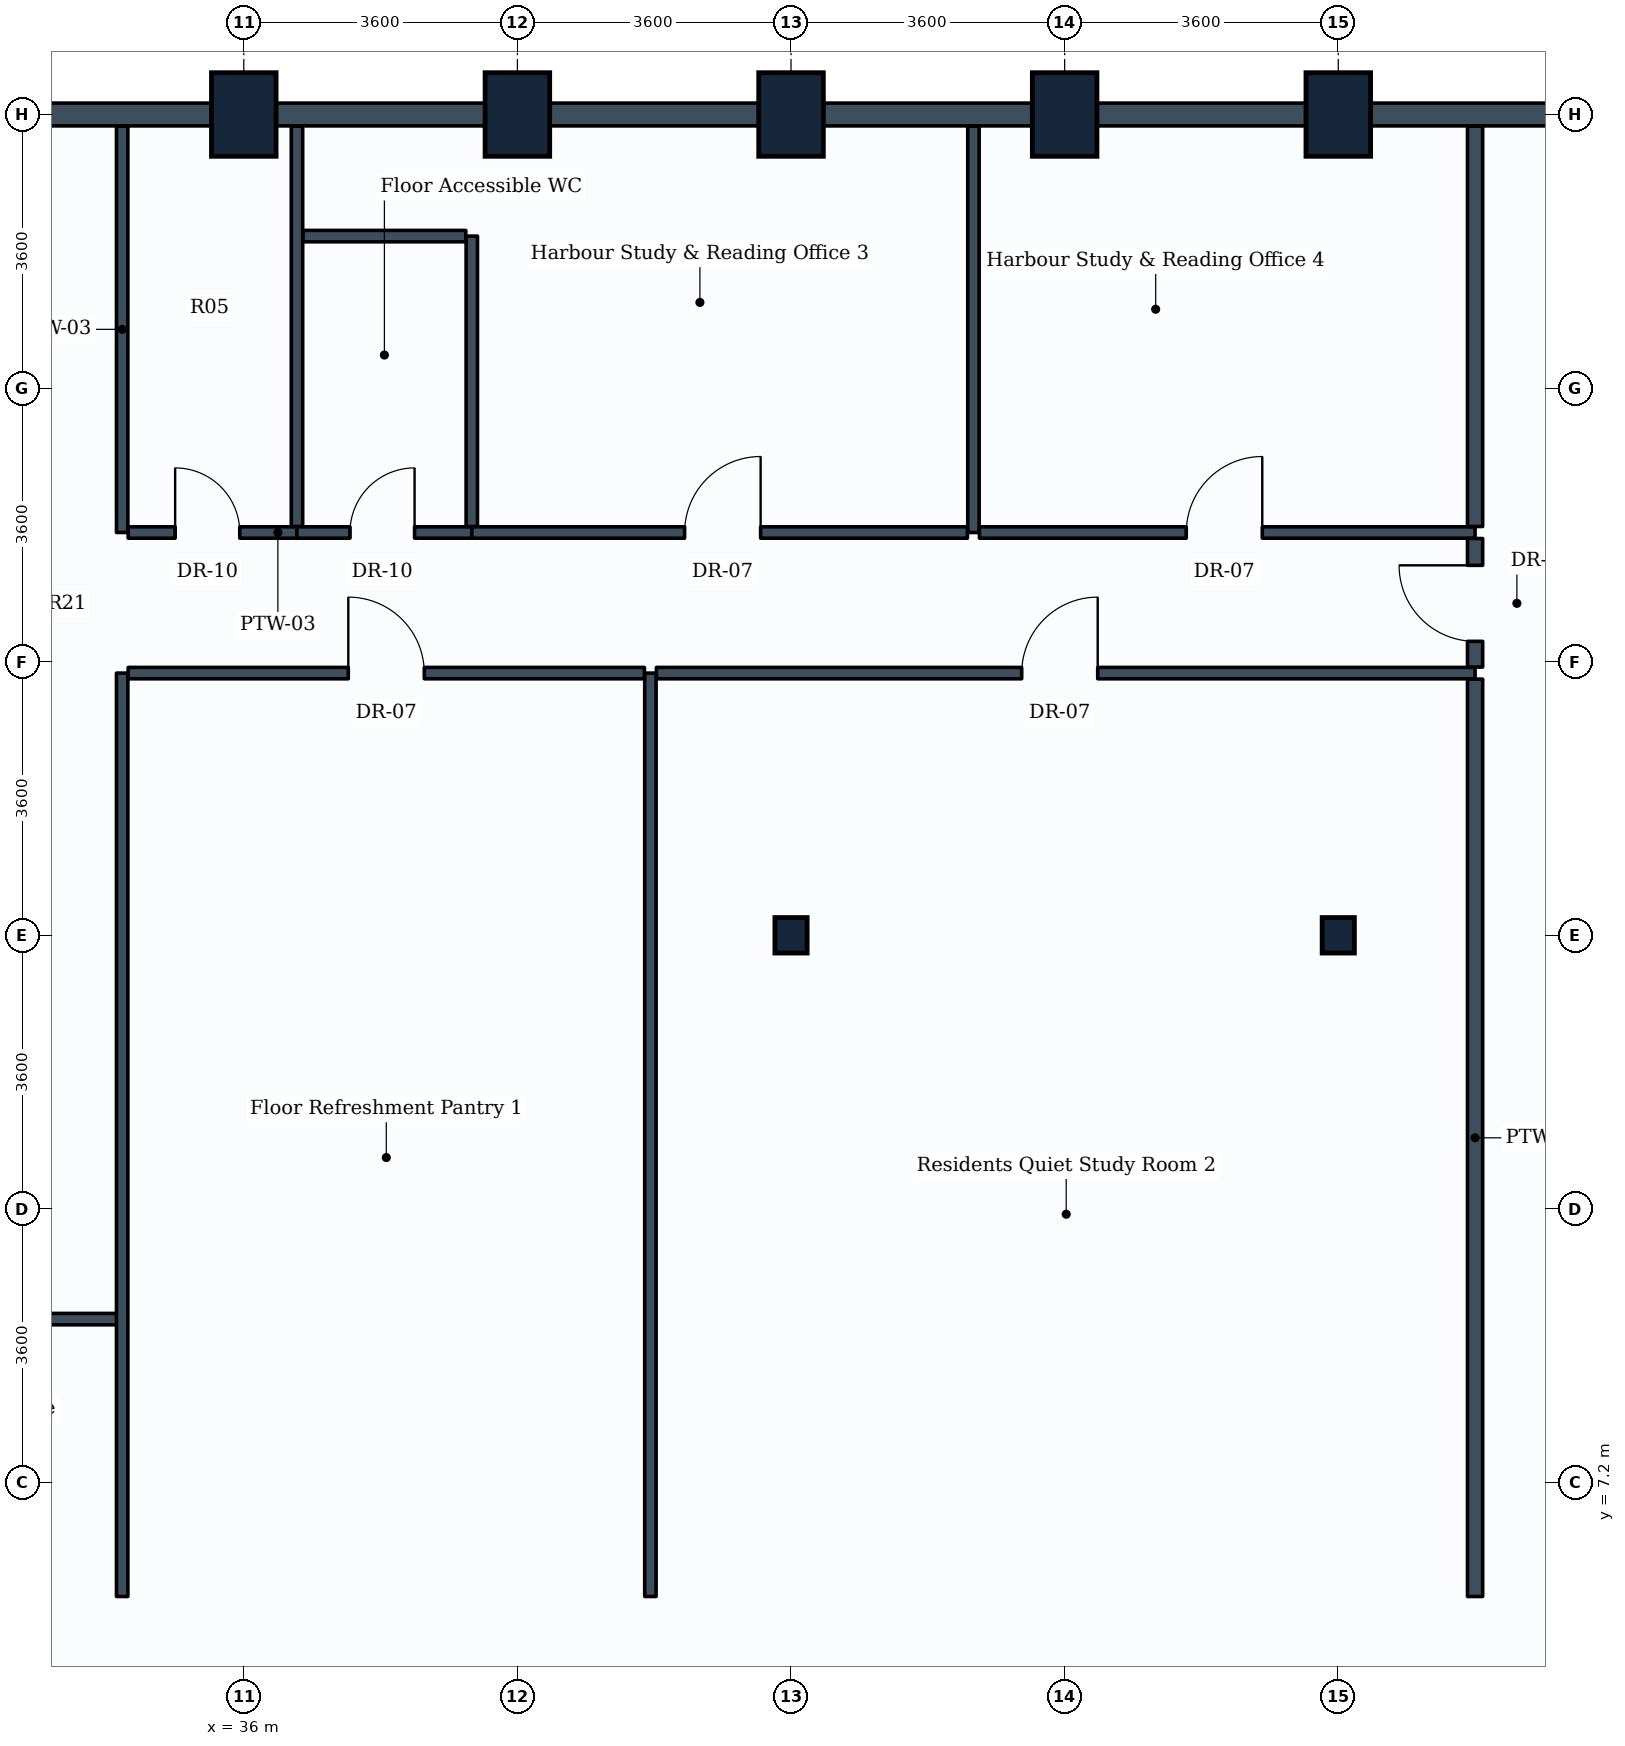
"""IFC4 building model, lengths in metres.
Left out: names, types, materials, properties, quantities, classifications, styles, units other than length and angle.
Written with IfcOpenShell. Run it as: python <this file> out.ifc"""

import sys

from ifc_helpers import new_model, si_unit, direction, frame, frame_2d, origin, origin_2d, place, context, subcontext, project, spatial, rectangle, i_section, extrude, element, fill, save


model = new_model("IFC4")
c1 = context("Model", 3, precision=1e-05, world=origin(), true_north=direction((0.0, 1.0)))
c2 = subcontext(c1, "Body", "Model", "MODEL_VIEW")
j1 = project(units=[si_unit("LENGTHUNIT", "METRE"), si_unit("PLANEANGLEUNIT", "RADIAN")], contexts=[c1])
p1 = place(None, origin())
s1 = spatial("IfcSite", under=j1, at=p1, CompositionType="ELEMENT")
p2 = place(p1, origin())
s2 = spatial("IfcBuilding", under=s1, at=p2, CompositionType="ELEMENT")
p3 = place(p2, frame((0.0, 0.0, 99.6)))
s3 = spatial("IfcBuildingStorey", under=s2, at=p3, CompositionType="ELEMENT", Elevation=99.6)
for number, where, z_axis, x_axis in (
    (1, (36.0, 25.2, 0.0), (0.0, 0.0, 1.0), (1.0, 0.0, 0.0)),
    (2, (39.6, 25.2, 0.0), (0.0, 0.0, 1.0), (1.0, 0.0, 0.0)),
):
    element("IfcColumn", number, at=place(p3, frame(where, z_axis=z_axis, x_axis=x_axis)), inside=s3, PredefinedType="COLUMN", context=c2, shape_type="SweptSolid", body=[
        extrude(rectangle(XDim=0.85, YDim=1.1, at=origin_2d()), origin(), (0.0, 0.0, 1.0), 3.9),
    ])
p4 = place(p3, frame((43.2, 14.4, 0.0), z_axis=(0.0, 0.0, 1.0), x_axis=(1.0, 0.0, 0.0)))
e3 = element("IfcColumn", 3, at=p4, inside=s3, PredefinedType="COLUMN", context=c2, shape_type="SweptSolid", body=[
    extrude(i_section(OverallWidth=0.424, OverallDepth=0.467, WebThickness=0.033, FlangeThickness=0.053, FilletRadius=0.015, at=origin_2d()), origin(), (0.0, 0.0, 1.0), 3.9),
])
for number, where, z_axis, x_axis in (
    (4, (43.2, 25.2, 0.0), (0.0, 0.0, 1.0), (1.0, 0.0, 0.0)),
    (5, (46.8, 25.2, 0.0), (0.0, 0.0, 1.0), (1.0, 0.0, 0.0)),
):
    element("IfcColumn", number, at=place(p3, frame(where, z_axis=z_axis, x_axis=x_axis)), inside=s3, PredefinedType="COLUMN", context=c2, shape_type="SweptSolid", body=[
        extrude(rectangle(XDim=0.85, YDim=1.1, at=origin_2d()), origin(), (0.0, 0.0, 1.0), 3.9),
    ])
p5 = place(p3, frame((50.4, 14.4, 0.0), z_axis=(0.0, 0.0, 1.0), x_axis=(1.0, 0.0, 0.0)))
e6 = element("IfcColumn", 6, at=p5, inside=s3, PredefinedType="COLUMN", context=c2, shape_type="SweptSolid", body=[
    extrude(i_section(OverallWidth=0.424, OverallDepth=0.467, WebThickness=0.033, FlangeThickness=0.053, FilletRadius=0.015, at=origin_2d()), origin(), (0.0, 0.0, 1.0), 3.9),
])
p6 = place(p3, frame((50.4, 25.2, 0.0), z_axis=(0.0, 0.0, 1.0), x_axis=(1.0, 0.0, 0.0)))
e7 = element("IfcColumn", 7, at=p6, inside=s3, PredefinedType="COLUMN", context=c2, shape_type="SweptSolid", body=[
    extrude(rectangle(XDim=0.85, YDim=1.1, at=origin_2d()), origin(), (0.0, 0.0, 1.0), 3.9),
])
p7 = place(p3, frame((50.4, 25.2, 0.0), z_axis=(0.0, 0.0, 1.0), x_axis=(1.0, 0.0, 0.0)))
e8 = element("IfcWall", 8, at=p7, inside=s3, PredefinedType="STANDARD", context=c2, shape_type="SweptSolid", body=[
    extrude(rectangle(XDim=3.6, YDim=0.3, at=frame_2d((1.8, 0.0))), origin(), (0.0, 0.0, 1.0), 2.93),
])
p8 = place(p3, frame((46.8, 25.2, 0.0), z_axis=(0.0, 0.0, 1.0), x_axis=(1.0, 0.0, 0.0)))
e9 = element("IfcWall", 9, at=p8, inside=s3, PredefinedType="STANDARD", context=c2, shape_type="SweptSolid", body=[
    extrude(rectangle(XDim=3.6, YDim=0.3, at=frame_2d((1.8, 0.0))), origin(), (0.0, 0.0, 1.0), 2.93),
])
p9 = place(p3, frame((43.2, 25.2, 0.0), z_axis=(0.0, 0.0, 1.0), x_axis=(1.0, 0.0, 0.0)))
e10 = element("IfcWall", 10, at=p9, inside=s3, PredefinedType="STANDARD", context=c2, shape_type="SweptSolid", body=[
    extrude(rectangle(XDim=3.6, YDim=0.3, at=frame_2d((1.8, 0.0))), origin(), (0.0, 0.0, 1.0), 2.93),
])
p10 = place(p3, frame((39.6, 25.2, 0.0), z_axis=(0.0, 0.0, 1.0), x_axis=(1.0, 0.0, 0.0)))
e11 = element("IfcWall", 11, at=p10, inside=s3, PredefinedType="STANDARD", context=c2, shape_type="SweptSolid", body=[
    extrude(rectangle(XDim=3.6, YDim=0.3, at=frame_2d((1.8, 0.0))), origin(), (0.0, 0.0, 1.0), 2.93),
])
for number, where, z_axis, x_axis in (
    (12, (36.0, 25.2, 0.0), (0.0, 0.0, 1.0), (1.0, 0.0, 0.0)),
    (13, (32.4, 25.2, 0.0), (0.0, 0.0, 1.0), (1.0, 0.0, 0.0)),
):
    element("IfcWall", number, at=place(p3, frame(where, z_axis=z_axis, x_axis=x_axis)), inside=s3, PredefinedType="STANDARD", context=c2, shape_type="SweptSolid", body=[
        extrude(rectangle(XDim=3.6, YDim=0.3, at=frame_2d((1.8, 0.0))), origin(), (0.0, 0.0, 1.0), 2.93),
    ])
p11 = place(p3, frame((34.4, 19.7, 0.0), z_axis=(0.0, 0.0, 1.0), x_axis=(0.0, 1.0, 0.0)))
e14 = element("IfcWall", 14, at=p11, inside=s3, PredefinedType="PARTITIONING", context=c2, shape_type="SweptSolid", body=[
    extrude(rectangle(XDim=5.346, YDim=0.15, at=frame_2d((2.673, 0.0))), origin(), (0.0, 0.0, 1.0), 2.93),
])
p12 = place(p3, frame((34.479, 19.7, 0.0), z_axis=(0.0, 0.0, 1.0), x_axis=(1.0, 0.0, 0.0)))
e15 = element("IfcWall", 15, at=p12, inside=s3, PredefinedType="PARTITIONING", context=c2, shape_type="SweptSolid", body=[
    extrude(rectangle(XDim=2.221, YDim=0.15, at=frame_2d((1.11, 0.0))), origin(), (0.0, 0.0, 1.0), 3.18),
])
p13 = place(p12, frame((0.618, 0.0, 0.0)))
e16 = element("IfcOpeningElement", 16, at=p13, cuts=e15, PredefinedType="OPENING", context=c2, shape_type="SweptSolid", body=[
    extrude(rectangle(XDim=0.85, YDim=2.1, at=frame_2d((0.425, 1.05))), frame((0.0, 0.085, 0.0), z_axis=(0.0, -1.0, 0.0), x_axis=(1.0, 0.0, 0.0)), (0.0, 0.0, 1.0), 0.17),
])
p14 = place(p3, frame((36.7, 19.779, 0.0), z_axis=(0.0, 0.0, 1.0), x_axis=(0.0, 1.0, 0.0)))
e17 = element("IfcWall", 17, at=p14, inside=s3, PredefinedType="PARTITIONING", context=c2, shape_type="SweptSolid", body=[
    extrude(rectangle(XDim=5.267, YDim=0.15, at=frame_2d((2.633, 0.0))), origin(), (0.0, 0.0, 1.0), 2.93),
])
p15 = place(p3, frame((36.7, 19.7, 0.0), z_axis=(0.0, 0.0, 1.0), x_axis=(1.0, 0.0, 0.0)))
e18 = element("IfcWall", 18, at=p15, inside=s3, PredefinedType="PARTITIONING", context=c2, shape_type="SweptSolid", body=[
    extrude(rectangle(XDim=2.3, YDim=0.15, at=frame_2d((1.15, 0.0))), origin(), (0.0, 0.0, 1.0), 3.635),
])
p16 = place(p15, frame((0.697, 0.0, 0.0)))
e19 = element("IfcOpeningElement", 19, at=p16, cuts=e18, PredefinedType="OPENING", context=c2, shape_type="SweptSolid", body=[
    extrude(rectangle(XDim=0.85, YDim=2.1, at=frame_2d((0.425, 1.05))), frame((0.0, 0.085, 0.0), z_axis=(0.0, -1.0, 0.0), x_axis=(1.0, 0.0, 0.0)), (0.0, 0.0, 1.0), 0.17),
])
p17 = place(p3, frame((39.0, 19.779, 0.0), z_axis=(0.0, 0.0, 1.0), x_axis=(0.0, 1.0, 0.0)))
e20 = element("IfcWall", 20, at=p17, inside=s3, PredefinedType="PARTITIONING", context=c2, shape_type="SweptSolid", body=[
    extrude(rectangle(XDim=3.821, YDim=0.15, at=frame_2d((1.911, 0.0))), origin(), (0.0, 0.0, 1.0), 3.18),
])
p18 = place(p3, frame((36.779, 23.6, 0.0), z_axis=(0.0, 0.0, 1.0), x_axis=(1.0, 0.0, 0.0)))
e21 = element("IfcWall", 21, at=p18, inside=s3, PredefinedType="PARTITIONING", context=c2, shape_type="SweptSolid", body=[
    extrude(rectangle(XDim=2.142, YDim=0.15, at=frame_2d((1.071, 0.0))), origin(), (0.0, 0.0, 1.0), 3.635),
])
p19 = place(p3, frame((28.879, 9.35, 0.0), z_axis=(0.0, 0.0, 1.0), x_axis=(1.0, 0.0, 0.0)))
e22 = element("IfcWall", 22, at=p19, inside=s3, PredefinedType="PARTITIONING", context=c2, shape_type="SweptSolid", body=[
    extrude(rectangle(XDim=5.521, YDim=0.15, at=frame_2d((2.76, 0.0))), origin(), (0.0, 0.0, 1.0), 3.635),
])
p20 = place(p19, frame((0.36, 0.0, 0.0)))
e23 = element("IfcOpeningElement", 23, at=p20, cuts=e22, PredefinedType="OPENING", context=c2, shape_type="SweptSolid", body=[
    extrude(rectangle(XDim=1.0, YDim=2.1, at=frame_2d((0.5, 1.05))), frame((0.0, 0.085, 0.0), z_axis=(0.0, -1.0, 0.0), x_axis=(1.0, 0.0, 0.0)), (0.0, 0.0, 1.0), 0.17),
])
for number, where, z_axis, x_axis in (
    (24, (34.4, 5.7, 0.0), (0.0, 0.0, 1.0), (0.0, 1.0, 0.0)),
    (25, (41.35, 5.7, 0.0), (0.0, 0.0, 1.0), (0.0, 1.0, 0.0)),
):
    element("IfcWall", number, at=place(p3, frame(where, z_axis=z_axis, x_axis=x_axis)), inside=s3, PredefinedType="PARTITIONING", context=c2, shape_type="SweptSolid", body=[
        extrude(rectangle(XDim=12.15, YDim=0.15, at=frame_2d((6.075, 0.0))), origin(), (0.0, 0.0, 1.0), 3.18),
    ])
p21 = place(p3, frame((34.479, 17.85, 0.0), z_axis=(0.0, 0.0, 1.0), x_axis=(1.0, 0.0, 0.0)))
e26 = element("IfcWall", 26, at=p21, inside=s3, PredefinedType="PARTITIONING", context=c2, shape_type="SweptSolid", body=[
    extrude(rectangle(XDim=6.792, YDim=0.15, at=frame_2d((3.396, 0.0))), origin(), (0.0, 0.0, 1.0), 3.18),
])
p22 = place(p21, frame((2.896, 0.0, 0.0)))
e27 = element("IfcOpeningElement", 27, at=p22, cuts=e26, PredefinedType="OPENING", context=c2, shape_type="SweptSolid", body=[
    extrude(rectangle(XDim=1.0, YDim=2.1, at=frame_2d((0.5, 1.05))), frame((0.0, 0.085, 0.0), z_axis=(0.0, -1.0, 0.0), x_axis=(1.0, 0.0, 0.0)), (0.0, 0.0, 1.0), 0.17),
])
p23 = place(p3, frame((41.429, 17.85, 0.0), z_axis=(0.0, 0.0, 1.0), x_axis=(1.0, 0.0, 0.0)))
e28 = element("IfcWall", 28, at=p23, inside=s3, PredefinedType="PARTITIONING", context=c2, shape_type="SweptSolid", body=[
    extrude(rectangle(XDim=10.771, YDim=0.15, at=frame_2d((5.385, 0.0))), origin(), (0.0, 0.0, 1.0), 3.18),
])
p24 = place(p23, frame((4.806, 0.0, 0.0)))
e29 = element("IfcOpeningElement", 29, at=p24, cuts=e28, PredefinedType="OPENING", context=c2, shape_type="SweptSolid", body=[
    extrude(rectangle(XDim=1.0, YDim=2.1, at=frame_2d((0.5, 1.05))), frame((0.0, 0.085, 0.0), z_axis=(0.0, -1.0, 0.0), x_axis=(1.0, 0.0, 0.0)), (0.0, 0.0, 1.0), 0.17),
])
p25 = place(p3, frame((45.6, 19.7, 0.0), z_axis=(0.0, 0.0, 1.0), x_axis=(0.0, 1.0, 0.0)))
e30 = element("IfcWall", 30, at=p25, inside=s3, PredefinedType="PARTITIONING", context=c2, shape_type="SweptSolid", body=[
    extrude(rectangle(XDim=5.346, YDim=0.15, at=frame_2d((2.673, 0.0))), origin(), (0.0, 0.0, 1.0), 2.93),
])
p26 = place(p3, frame((39.0, 19.7, 0.0), z_axis=(0.0, 0.0, 1.0), x_axis=(1.0, 0.0, 0.0)))
e31 = element("IfcWall", 31, at=p26, inside=s3, PredefinedType="PARTITIONING", context=c2, shape_type="SweptSolid", body=[
    extrude(rectangle(XDim=6.521, YDim=0.15, at=frame_2d((3.26, 0.0))), origin(), (0.0, 0.0, 1.0), 3.19),
])
p27 = place(p26, frame((2.8, 0.0, 0.0)))
e32 = element("IfcOpeningElement", 32, at=p27, cuts=e31, PredefinedType="OPENING", context=c2, shape_type="SweptSolid", body=[
    extrude(rectangle(XDim=1.0, YDim=2.1, at=frame_2d((0.5, 1.05))), frame((0.0, 0.085, 0.0), z_axis=(0.0, -1.0, 0.0), x_axis=(1.0, 0.0, 0.0)), (0.0, 0.0, 1.0), 0.17),
])
p28 = place(p3, frame((45.679, 19.7, 0.0), z_axis=(0.0, 0.0, 1.0), x_axis=(1.0, 0.0, 0.0)))
e33 = element("IfcWall", 33, at=p28, inside=s3, PredefinedType="PARTITIONING", context=c2, shape_type="SweptSolid", body=[
    extrude(rectangle(XDim=6.521, YDim=0.15, at=frame_2d((3.26, 0.0))), origin(), (0.0, 0.0, 1.0), 3.19),
])
p29 = place(p28, frame((2.721, 0.0, 0.0)))
e34 = element("IfcOpeningElement", 34, at=p29, cuts=e33, PredefinedType="OPENING", context=c2, shape_type="SweptSolid", body=[
    extrude(rectangle(XDim=1.0, YDim=2.1, at=frame_2d((0.5, 1.05))), frame((0.0, 0.085, 0.0), z_axis=(0.0, -1.0, 0.0), x_axis=(1.0, 0.0, 0.0)), (0.0, 0.0, 1.0), 0.17),
])
p30 = place(p3, frame((52.2, 5.7, 0.0), z_axis=(0.0, 0.0, 1.0), x_axis=(0.0, 1.0, 0.0)))
e35 = element("IfcWall", 35, at=p30, inside=s3, PredefinedType="PARTITIONING", context=c2, shape_type="SweptSolid", body=[
    extrude(rectangle(XDim=12.071, YDim=0.2, at=frame_2d((6.036, 0.0))), origin(), (0.0, 0.0, 1.0), 3.18),
])
p31 = place(p3, frame((52.2, 19.779, 0.0), z_axis=(0.0, 0.0, 1.0), x_axis=(0.0, 1.0, 0.0)))
e36 = element("IfcWall", 36, at=p31, inside=s3, PredefinedType="PARTITIONING", context=c2, shape_type="SweptSolid", body=[
    extrude(rectangle(XDim=5.267, YDim=0.2, at=frame_2d((2.633, 0.0))), origin(), (0.0, 0.0, 1.0), 2.93),
])
p32 = place(p3, frame((52.2, 17.929, 0.0), z_axis=(0.0, 0.0, 1.0), x_axis=(0.0, 1.0, 0.0)))
e37 = element("IfcWall", 37, at=p32, inside=s3, PredefinedType="PARTITIONING", context=c2, shape_type="SweptSolid", body=[
    extrude(rectangle(XDim=1.692, YDim=0.2, at=frame_2d((0.846, 0.0))), origin(), (0.0, 0.0, 1.0), 3.635),
])
p33 = place(p32, frame((0.339, 0.0, 0.0)))
e38 = element("IfcOpeningElement", 38, at=p33, cuts=e37, PredefinedType="OPENING", context=c2, shape_type="SweptSolid", body=[
    extrude(rectangle(XDim=1.0, YDim=2.1, at=frame_2d((0.5, 1.05))), frame((0.0, 0.11, 0.0), z_axis=(0.0, -1.0, 0.0), x_axis=(1.0, 0.0, 0.0)), (0.0, 0.0, 1.0), 0.22),
])
p34 = place(p13, origin())
e39 = element("IfcDoor", 39, at=p34, inside=s3, OperationType="SINGLE_SWING_LEFT", PredefinedType="DOOR", context=c2, shape_type="SweptSolid", body=[
    extrude(rectangle(XDim=0.85, YDim=2.1, at=frame_2d((0.425, 1.05))), frame((0.0, 0.025, 0.0), z_axis=(0.0, -1.0, 0.0), x_axis=(1.0, 0.0, 0.0)), (0.0, 0.0, 1.0), 0.05),
])
fill(e16, e39)
p35 = place(p16, origin())
e40 = element("IfcDoor", 40, at=p35, inside=s3, OperationType="SINGLE_SWING_RIGHT", PredefinedType="DOOR", context=c2, shape_type="SweptSolid", body=[
    extrude(rectangle(XDim=0.85, YDim=2.1, at=frame_2d((0.425, 1.05))), frame((0.0, 0.025, 0.0), z_axis=(0.0, -1.0, 0.0), x_axis=(1.0, 0.0, 0.0)), (0.0, 0.0, 1.0), 0.05),
])
fill(e19, e40)
p36 = place(p22, origin())
e41 = element("IfcDoor", 41, at=p36, inside=s3, OperationType="SINGLE_SWING_LEFT", PredefinedType="DOOR", context=c2, shape_type="SweptSolid", body=[
    extrude(rectangle(XDim=1.0, YDim=2.1, at=frame_2d((0.5, 1.05))), frame((0.0, 0.025, 0.0), z_axis=(0.0, -1.0, 0.0), x_axis=(1.0, 0.0, 0.0)), (0.0, 0.0, 1.0), 0.05),
])
fill(e27, e41)
p37 = place(p24, origin())
e42 = element("IfcDoor", 42, at=p37, inside=s3, OperationType="SINGLE_SWING_RIGHT", PredefinedType="DOOR", context=c2, shape_type="SweptSolid", body=[
    extrude(rectangle(XDim=1.0, YDim=2.1, at=frame_2d((0.5, 1.05))), frame((0.0, 0.025, 0.0), z_axis=(0.0, -1.0, 0.0), x_axis=(1.0, 0.0, 0.0)), (0.0, 0.0, 1.0), 0.05),
])
fill(e29, e42)
p38 = place(p27, origin())
e43 = element("IfcDoor", 43, at=p38, inside=s3, OperationType="SINGLE_SWING_RIGHT", PredefinedType="DOOR", context=c2, shape_type="SweptSolid", body=[
    extrude(rectangle(XDim=1.0, YDim=2.1, at=frame_2d((0.5, 1.05))), frame((0.0, 0.025, 0.0), z_axis=(0.0, -1.0, 0.0), x_axis=(1.0, 0.0, 0.0)), (0.0, 0.0, 1.0), 0.05),
])
fill(e32, e43)
p39 = place(p29, origin())
e44 = element("IfcDoor", 44, at=p39, inside=s3, OperationType="SINGLE_SWING_RIGHT", PredefinedType="DOOR", context=c2, shape_type="SweptSolid", body=[
    extrude(rectangle(XDim=1.0, YDim=2.1, at=frame_2d((0.5, 1.05))), frame((0.0, 0.025, 0.0), z_axis=(0.0, -1.0, 0.0), x_axis=(1.0, 0.0, 0.0)), (0.0, 0.0, 1.0), 0.05),
])
fill(e34, e44)
p40 = place(p33, origin())
e45 = element("IfcDoor", 45, at=p40, inside=s3, OperationType="SINGLE_SWING_RIGHT", PredefinedType="DOOR", context=c2, shape_type="SweptSolid", body=[
    extrude(rectangle(XDim=1.0, YDim=2.1, at=frame_2d((0.5, 1.05))), frame((0.0, 0.025, 0.0), z_axis=(0.0, -1.0, 0.0), x_axis=(1.0, 0.0, 0.0)), (0.0, 0.0, 1.0), 0.05),
])
fill(e38, e45)
save(model, sys.argv[1])
